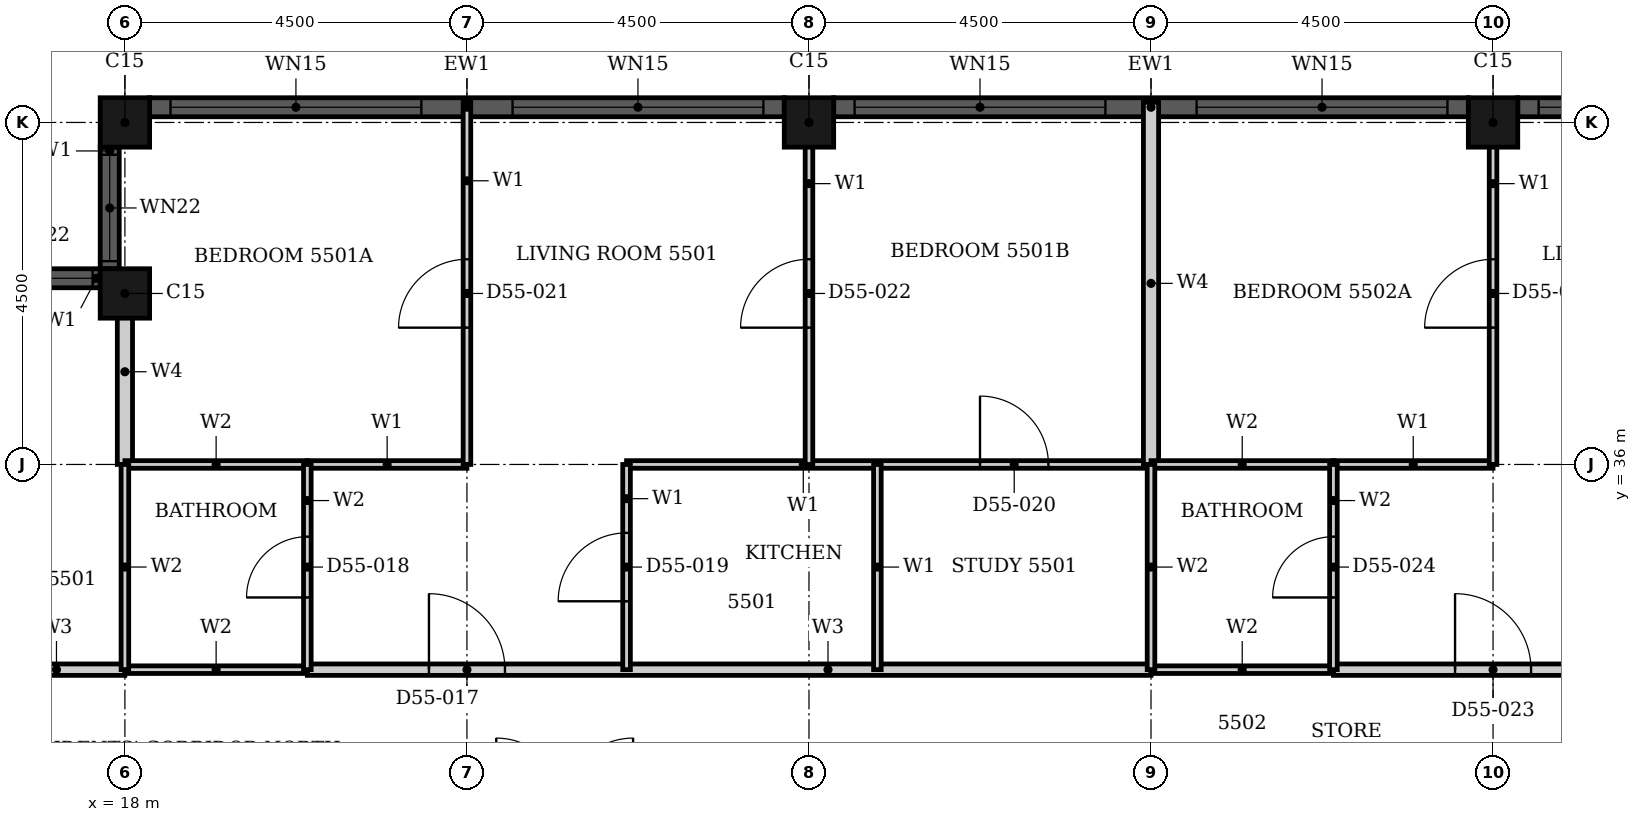
"""IFC4 building model, lengths in metres.
Left out: names, types, materials, properties, quantities, classifications, styles, units other than length and angle.
Written with IfcOpenShell. Run it as: python <this file> out.ifc"""

import sys

from ifc_helpers import new_model, si_unit, direction, frame, frame_2d, origin, origin_2d, place, context, subcontext, project, spatial, rectangle, hollow_rectangle, extrude, element, fill, save


model = new_model("IFC4")
c1 = context("Model", 3, precision=1e-05, world=origin(), true_north=direction((0.0, 1.0)))
c2 = subcontext(c1, "Body", "Model", "MODEL_VIEW")
j1 = project(units=[si_unit("LENGTHUNIT", "METRE"), si_unit("PLANEANGLEUNIT", "RADIAN")], contexts=[c1])
p1 = place(None, origin())
s1 = spatial("IfcSite", under=j1, at=p1, CompositionType="ELEMENT")
p2 = place(p1, origin())
s2 = spatial("IfcBuilding", under=s1, at=p2, CompositionType="ELEMENT")
p3 = place(p2, frame((0.0, 0.0, 218.3)))
s3 = spatial("IfcBuildingStorey", under=s2, at=p3, CompositionType="ELEMENT", Elevation=218.3)
for number, where, z_axis, x_axis in (
    (1, (36.0, 40.5, 0.0), (0.0, 0.0, 1.0), (1.0, 0.0, 0.0)),
    (2, (27.0, 40.5, 0.0), (0.0, 0.0, 1.0), (1.0, 0.0, 0.0)),
    (3, (18.0, 40.5, 0.0), (0.0, 0.0, 1.0), (1.0, 0.0, 0.0)),
    (4, (18.0, 38.25, 0.0), (0.0, 0.0, 1.0), (1.0, 0.0, 0.0)),
):
    element("IfcColumn", number, at=place(p3, frame(where, z_axis=z_axis, x_axis=x_axis)), inside=s3, PredefinedType="COLUMN", context=c2, shape_type="SweptSolid", body=[
        extrude(hollow_rectangle(XDim=0.65, YDim=0.65, WallThickness=0.021, at=origin_2d()), origin(), (0.0, 0.0, 1.0), 3.7),
    ])
p4 = place(p3, frame((44.675, 40.7, 0.0), z_axis=(0.0, 0.0, 1.0), x_axis=(-1.0, 0.0, 0.0)))
e5 = element("IfcWall", 5, at=p4, inside=s3, PredefinedType="SOLIDWALL", context=c2, shape_type="SweptSolid", body=[
    extrude(rectangle(XDim=8.35, YDim=0.25, at=frame_2d((4.175, 0.0))), origin(), (0.0, 0.0, 1.0), 3.7),
])
p5 = place(p4, frame((0.275, 0.0, 0.45)))
e6 = element("IfcOpeningElement", 6, at=p5, cuts=e5, PredefinedType="OPENING", context=c2, shape_type="SweptSolid", body=[
    extrude(rectangle(XDim=3.3, YDim=2.3, at=frame_2d((1.65, 1.15))), frame((0.0, 0.135, 0.0), z_axis=(0.0, -1.0, 0.0), x_axis=(1.0, 0.0, 0.0)), (0.0, 0.0, 1.0), 0.27),
])
p6 = place(p4, frame((4.775, 0.0, 0.45)))
e7 = element("IfcOpeningElement", 7, at=p6, cuts=e5, PredefinedType="OPENING", context=c2, shape_type="SweptSolid", body=[
    extrude(rectangle(XDim=3.3, YDim=2.3, at=frame_2d((1.65, 1.15))), frame((0.0, 0.135, 0.0), z_axis=(0.0, -1.0, 0.0), x_axis=(1.0, 0.0, 0.0)), (0.0, 0.0, 1.0), 0.27),
])
p7 = place(p3, frame((35.675, 40.7, 0.0), z_axis=(0.0, 0.0, 1.0), x_axis=(-1.0, 0.0, 0.0)))
e8 = element("IfcWall", 8, at=p7, inside=s3, PredefinedType="SOLIDWALL", context=c2, shape_type="SweptSolid", body=[
    extrude(rectangle(XDim=8.35, YDim=0.25, at=frame_2d((4.175, 0.0))), origin(), (0.0, 0.0, 1.0), 3.7),
])
p8 = place(p7, frame((0.275, 0.0, 0.45)))
e9 = element("IfcOpeningElement", 9, at=p8, cuts=e8, PredefinedType="OPENING", context=c2, shape_type="SweptSolid", body=[
    extrude(rectangle(XDim=3.3, YDim=2.3, at=frame_2d((1.65, 1.15))), frame((0.0, 0.135, 0.0), z_axis=(0.0, -1.0, 0.0), x_axis=(1.0, 0.0, 0.0)), (0.0, 0.0, 1.0), 0.27),
])
p9 = place(p7, frame((4.775, 0.0, 0.45)))
e10 = element("IfcOpeningElement", 10, at=p9, cuts=e8, PredefinedType="OPENING", context=c2, shape_type="SweptSolid", body=[
    extrude(rectangle(XDim=3.3, YDim=2.3, at=frame_2d((1.65, 1.15))), frame((0.0, 0.135, 0.0), z_axis=(0.0, -1.0, 0.0), x_axis=(1.0, 0.0, 0.0)), (0.0, 0.0, 1.0), 0.27),
])
p10 = place(p3, frame((26.675, 40.7, 0.0), z_axis=(0.0, 0.0, 1.0), x_axis=(-1.0, 0.0, 0.0)))
e11 = element("IfcWall", 11, at=p10, inside=s3, PredefinedType="SOLIDWALL", context=c2, shape_type="SweptSolid", body=[
    extrude(rectangle(XDim=8.35, YDim=0.25, at=frame_2d((4.175, 0.0))), origin(), (0.0, 0.0, 1.0), 3.7),
])
p11 = place(p10, frame((0.275, 0.0, 0.45)))
e12 = element("IfcOpeningElement", 12, at=p11, cuts=e11, PredefinedType="OPENING", context=c2, shape_type="SweptSolid", body=[
    extrude(rectangle(XDim=3.3, YDim=2.3, at=frame_2d((1.65, 1.15))), frame((0.0, 0.135, 0.0), z_axis=(0.0, -1.0, 0.0), x_axis=(1.0, 0.0, 0.0)), (0.0, 0.0, 1.0), 0.27),
])
p12 = place(p10, frame((4.775, 0.0, 0.45)))
e13 = element("IfcOpeningElement", 13, at=p12, cuts=e11, PredefinedType="OPENING", context=c2, shape_type="SweptSolid", body=[
    extrude(rectangle(XDim=3.3, YDim=2.3, at=frame_2d((1.65, 1.15))), frame((0.0, 0.135, 0.0), z_axis=(0.0, -1.0, 0.0), x_axis=(1.0, 0.0, 0.0)), (0.0, 0.0, 1.0), 0.27),
])
p13 = place(p3, frame((17.8, 40.175, 0.0), z_axis=(0.0, 0.0, 1.0), x_axis=(0.0, -1.0, 0.0)))
e14 = element("IfcWall", 14, at=p13, inside=s3, PredefinedType="SOLIDWALL", context=c2, shape_type="SweptSolid", body=[
    extrude(rectangle(XDim=1.6, YDim=0.25, at=frame_2d((0.8, 0.0))), origin(), (0.0, 0.0, 1.0), 3.7),
])
p14 = place(p13, frame((0.1, 0.0, 0.9)))
e15 = element("IfcOpeningElement", 15, at=p14, cuts=e14, PredefinedType="OPENING", context=c2, shape_type="SweptSolid", body=[
    extrude(rectangle(XDim=1.4, YDim=1.85, at=frame_2d((0.7, 0.925))), frame((0.0, 0.135, 0.0), z_axis=(0.0, -1.0, 0.0), x_axis=(1.0, 0.0, 0.0)), (0.0, 0.0, 1.0), 0.27),
])
p15 = place(p3, frame((17.675, 38.45, 0.0), z_axis=(0.0, 0.0, 1.0), x_axis=(-1.0, 0.0, 0.0)))
e16 = element("IfcWall", 16, at=p15, inside=s3, PredefinedType="SOLIDWALL", context=c2, shape_type="SweptSolid", body=[
    extrude(rectangle(XDim=1.6, YDim=0.25, at=frame_2d((0.8, 0.0))), origin(), (0.0, 0.0, 1.0), 3.7),
])
p16 = place(p15, frame((0.1, 0.0, 0.9)))
e17 = element("IfcOpeningElement", 17, at=p16, cuts=e16, PredefinedType="OPENING", context=c2, shape_type="SweptSolid", body=[
    extrude(rectangle(XDim=1.4, YDim=1.85, at=frame_2d((0.7, 0.925))), frame((0.0, 0.135, 0.0), z_axis=(0.0, -1.0, 0.0), x_axis=(1.0, 0.0, 0.0)), (0.0, 0.0, 1.0), 0.27),
])
p17 = place(p3, frame((20.4, 33.3, 0.0), z_axis=(0.0, 0.0, 1.0), x_axis=(1.0, 0.0, 0.0)))
e18 = element("IfcWall", 18, at=p17, inside=s3, PredefinedType="PARTITIONING", context=c2, shape_type="SweptSolid", body=[
    extrude(rectangle(XDim=11.1, YDim=0.15, at=frame_2d((5.55, 0.0))), origin(), (0.0, 0.0, 1.0), 3.4),
])
p18 = place(p17, frame((1.6, 0.0, 0.0)))
e19 = element("IfcOpeningElement", 19, at=p18, cuts=e18, PredefinedType="OPENING", context=c2, shape_type="SweptSolid", body=[
    extrude(rectangle(XDim=1.0, YDim=2.2, at=frame_2d((0.5, 1.1))), frame((0.0, 0.085, 0.0), z_axis=(0.0, -1.0, 0.0), x_axis=(1.0, 0.0, 0.0)), (0.0, 0.0, 1.0), 0.17),
])
p19 = place(p3, frame((33.9, 33.3, 0.0), z_axis=(0.0, 0.0, 1.0), x_axis=(1.0, 0.0, 0.0)))
e20 = element("IfcWall", 20, at=p19, inside=s3, PredefinedType="PARTITIONING", context=c2, shape_type="SweptSolid", body=[
    extrude(rectangle(XDim=11.1, YDim=0.15, at=frame_2d((5.55, 0.0))), origin(), (0.0, 0.0, 1.0), 3.4),
])
p20 = place(p19, frame((1.6, 0.0, 0.0)))
e21 = element("IfcOpeningElement", 21, at=p20, cuts=e20, PredefinedType="OPENING", context=c2, shape_type="SweptSolid", body=[
    extrude(rectangle(XDim=1.0, YDim=2.2, at=frame_2d((0.5, 1.1))), frame((0.0, 0.085, 0.0), z_axis=(0.0, -1.0, 0.0), x_axis=(1.0, 0.0, 0.0)), (0.0, 0.0, 1.0), 0.17),
])
p21 = place(p3, frame((16.2, 33.3, 0.0), z_axis=(0.0, 0.0, 1.0), x_axis=(1.0, 0.0, 0.0)))
e22 = element("IfcWall", 22, at=p21, inside=s3, PredefinedType="PARTITIONING", context=c2, shape_type="SweptSolid", body=[
    extrude(rectangle(XDim=1.799, YDim=0.15, at=frame_2d((0.899, 0.0))), origin(), (0.0, 0.0, 1.0), 3.4),
])
p22 = place(p3, frame((20.4, 36.0, 0.0), z_axis=(0.0, 0.0, 1.0), x_axis=(1.0, 0.0, 0.0)))
e23 = element("IfcWall", 23, at=p22, inside=s3, PredefinedType="PARTITIONING", context=c2, shape_type="SweptSolid", body=[
    extrude(rectangle(XDim=2.1, YDim=0.1, at=frame_2d((1.05, 0.0))), origin(), (0.0, 0.0, 1.0), 3.4),
])
p23 = place(p3, frame((24.6, 36.0, 0.0), z_axis=(0.0, 0.0, 1.0), x_axis=(1.0, 0.0, 0.0)))
e24 = element("IfcWall", 24, at=p23, inside=s3, PredefinedType="PARTITIONING", context=c2, shape_type="SweptSolid", body=[
    extrude(rectangle(XDim=6.9, YDim=0.1, at=frame_2d((3.45, 0.0))), origin(), (0.0, 0.0, 1.0), 3.4),
])
p24 = place(p23, frame((4.65, 0.0, 0.0)))
e25 = element("IfcOpeningElement", 25, at=p24, cuts=e24, PredefinedType="OPENING", context=c2, shape_type="SweptSolid", body=[
    extrude(rectangle(XDim=0.9, YDim=2.1, at=frame_2d((0.45, 1.05))), frame((0.0, 0.06, 0.0), z_axis=(0.0, -1.0, 0.0), x_axis=(1.0, 0.0, 0.0)), (0.0, 0.0, 1.0), 0.12),
])
p25 = place(p3, frame((33.9, 36.0, 0.0), z_axis=(0.0, 0.0, 1.0), x_axis=(1.0, 0.0, 0.0)))
e26 = element("IfcWall", 26, at=p25, inside=s3, PredefinedType="PARTITIONING", context=c2, shape_type="SweptSolid", body=[
    extrude(rectangle(XDim=2.1, YDim=0.1, at=frame_2d((1.05, 0.0))), origin(), (0.0, 0.0, 1.0), 3.4),
])
p26 = place(p3, frame((22.5, 36.0, 0.0), z_axis=(0.0, 0.0, 1.0), x_axis=(0.0, 1.0, 0.0)))
e27 = element("IfcWall", 27, at=p26, inside=s3, PredefinedType="PARTITIONING", context=c2, shape_type="SweptSolid", body=[
    extrude(rectangle(XDim=4.765, YDim=0.1, at=frame_2d((2.382, 0.0))), origin(), (0.0, 0.0, 1.0), 3.4),
])
p27 = place(p26, frame((1.8, 0.0, 0.0)))
e28 = element("IfcOpeningElement", 28, at=p27, cuts=e27, PredefinedType="OPENING", context=c2, shape_type="SweptSolid", body=[
    extrude(rectangle(XDim=0.9, YDim=2.1, at=frame_2d((0.45, 1.05))), frame((0.0, 0.06, 0.0), z_axis=(0.0, -1.0, 0.0), x_axis=(1.0, 0.0, 0.0)), (0.0, 0.0, 1.0), 0.12),
])
p28 = place(p3, frame((24.6, 33.3, 0.0), z_axis=(0.0, 0.0, 1.0), x_axis=(0.0, 1.0, 0.0)))
e29 = element("IfcWall", 29, at=p28, inside=s3, PredefinedType="PARTITIONING", context=c2, shape_type="SweptSolid", body=[
    extrude(rectangle(XDim=2.7, YDim=0.1, at=frame_2d((1.35, 0.0))), origin(), (0.0, 0.0, 1.0), 3.4),
])
p29 = place(p28, frame((0.9, 0.0, 0.0)))
e30 = element("IfcOpeningElement", 30, at=p29, cuts=e29, PredefinedType="OPENING", context=c2, shape_type="SweptSolid", body=[
    extrude(rectangle(XDim=0.9, YDim=2.1, at=frame_2d((0.45, 1.05))), frame((0.0, 0.06, 0.0), z_axis=(0.0, -1.0, 0.0), x_axis=(1.0, 0.0, 0.0)), (0.0, 0.0, 1.0), 0.12),
])
p30 = place(p3, frame((27.0, 36.0, 0.0), z_axis=(0.0, 0.0, 1.0), x_axis=(0.0, 1.0, 0.0)))
e31 = element("IfcWall", 31, at=p30, inside=s3, PredefinedType="PARTITIONING", context=c2, shape_type="SweptSolid", body=[
    extrude(rectangle(XDim=4.69, YDim=0.1, at=frame_2d((2.345, 0.0))), origin(), (0.0, 0.0, 1.0), 3.4),
])
p31 = place(p30, frame((1.8, 0.0, 0.0)))
e32 = element("IfcOpeningElement", 32, at=p31, cuts=e31, PredefinedType="OPENING", context=c2, shape_type="SweptSolid", body=[
    extrude(rectangle(XDim=0.9, YDim=2.1, at=frame_2d((0.45, 1.05))), frame((0.0, 0.06, 0.0), z_axis=(0.0, -1.0, 0.0), x_axis=(1.0, 0.0, 0.0)), (0.0, 0.0, 1.0), 0.12),
])
p32 = place(p3, frame((27.9, 33.3, 0.0), z_axis=(0.0, 0.0, 1.0), x_axis=(0.0, 1.0, 0.0)))
e33 = element("IfcWall", 33, at=p32, inside=s3, PredefinedType="PARTITIONING", context=c2, shape_type="SweptSolid", body=[
    extrude(rectangle(XDim=2.7, YDim=0.1, at=frame_2d((1.35, 0.0))), origin(), (0.0, 0.0, 1.0), 3.4),
])
p33 = place(p3, frame((36.0, 36.0, 0.0), z_axis=(0.0, 0.0, 1.0), x_axis=(0.0, 1.0, 0.0)))
e34 = element("IfcWall", 34, at=p33, inside=s3, PredefinedType="PARTITIONING", context=c2, shape_type="SweptSolid", body=[
    extrude(rectangle(XDim=4.69, YDim=0.1, at=frame_2d((2.345, 0.0))), origin(), (0.0, 0.0, 1.0), 3.4),
])
p34 = place(p33, frame((1.8, 0.0, 0.0)))
e35 = element("IfcOpeningElement", 35, at=p34, cuts=e34, PredefinedType="OPENING", context=c2, shape_type="SweptSolid", body=[
    extrude(rectangle(XDim=0.9, YDim=2.1, at=frame_2d((0.45, 1.05))), frame((0.0, 0.06, 0.0), z_axis=(0.0, -1.0, 0.0), x_axis=(1.0, 0.0, 0.0)), (0.0, 0.0, 1.0), 0.12),
])
p35 = place(p3, frame((18.0, 36.0, 0.0), z_axis=(0.0, 0.0, 1.0), x_axis=(0.0, 1.0, 0.0)))
e36 = element("IfcWall", 36, at=p35, inside=s3, PredefinedType="PARTITIONING", context=c2, shape_type="SweptSolid", body=[
    extrude(rectangle(XDim=2.44, YDim=0.2, at=frame_2d((1.22, 0.0))), origin(), (0.0, 0.0, 1.0), 3.4),
])
p36 = place(p3, frame((31.5, 36.0, 0.0), z_axis=(0.0, 0.0, 1.0), x_axis=(0.0, 1.0, 0.0)))
e37 = element("IfcWall", 37, at=p36, inside=s3, PredefinedType="PARTITIONING", context=c2, shape_type="SweptSolid", body=[
    extrude(rectangle(XDim=4.765, YDim=0.2, at=frame_2d((2.382, 0.0))), origin(), (0.0, 0.0, 1.0), 3.4),
])
for number, where, z_axis, x_axis in (
    (38, (18.0, 33.3, 0.0), (0.0, 0.0, 1.0), (1.0, 0.0, 0.0)),
    (39, (31.5, 33.3, 0.0), (0.0, 0.0, 1.0), (1.0, 0.0, 0.0)),
    (40, (18.0, 36.0, 0.0), (0.0, 0.0, 1.0), (1.0, 0.0, 0.0)),
    (41, (31.5, 36.0, 0.0), (0.0, 0.0, 1.0), (1.0, 0.0, 0.0)),
):
    element("IfcWall", number, at=place(p3, frame(where, z_axis=z_axis, x_axis=x_axis)), inside=s3, PredefinedType="PARTITIONING", context=c2, shape_type="SweptSolid", body=[
        extrude(rectangle(XDim=2.4, YDim=0.1, at=frame_2d((1.2, 0.0))), origin(), (0.0, 0.0, 1.0), 3.4),
    ])
p37 = place(p3, frame((18.0, 33.301, 0.0), z_axis=(0.0, 0.0, 1.0), x_axis=(0.0, 1.0, 0.0)))
e42 = element("IfcWall", 42, at=p37, inside=s3, PredefinedType="PARTITIONING", context=c2, shape_type="SweptSolid", body=[
    extrude(rectangle(XDim=2.699, YDim=0.1, at=frame_2d((1.35, 0.0))), origin(), (0.0, 0.0, 1.0), 3.4),
])
p38 = place(p3, frame((20.4, 33.3, 0.0), z_axis=(0.0, 0.0, 1.0), x_axis=(0.0, 1.0, 0.0)))
e43 = element("IfcWall", 43, at=p38, inside=s3, PredefinedType="PARTITIONING", context=c2, shape_type="SweptSolid", body=[
    extrude(rectangle(XDim=2.7, YDim=0.1, at=frame_2d((1.35, 0.0))), origin(), (0.0, 0.0, 1.0), 3.4),
])
p39 = place(p38, frame((0.95, 0.0, 0.0)))
e44 = element("IfcOpeningElement", 44, at=p39, cuts=e43, PredefinedType="OPENING", context=c2, shape_type="SweptSolid", body=[
    extrude(rectangle(XDim=0.8, YDim=2.1, at=frame_2d((0.4, 1.05))), frame((0.0, 0.06, 0.0), z_axis=(0.0, -1.0, 0.0), x_axis=(1.0, 0.0, 0.0)), (0.0, 0.0, 1.0), 0.12),
])
p40 = place(p3, frame((31.5, 33.3, 0.0), z_axis=(0.0, 0.0, 1.0), x_axis=(0.0, 1.0, 0.0)))
e45 = element("IfcWall", 45, at=p40, inside=s3, PredefinedType="PARTITIONING", context=c2, shape_type="SweptSolid", body=[
    extrude(rectangle(XDim=2.7, YDim=0.1, at=frame_2d((1.35, 0.0))), origin(), (0.0, 0.0, 1.0), 3.4),
])
p41 = place(p3, frame((33.9, 33.3, 0.0), z_axis=(0.0, 0.0, 1.0), x_axis=(0.0, 1.0, 0.0)))
e46 = element("IfcWall", 46, at=p41, inside=s3, PredefinedType="PARTITIONING", context=c2, shape_type="SweptSolid", body=[
    extrude(rectangle(XDim=2.7, YDim=0.1, at=frame_2d((1.35, 0.0))), origin(), (0.0, 0.0, 1.0), 3.4),
])
p42 = place(p41, frame((0.95, 0.0, 0.0)))
e47 = element("IfcOpeningElement", 47, at=p42, cuts=e46, PredefinedType="OPENING", context=c2, shape_type="SweptSolid", body=[
    extrude(rectangle(XDim=0.8, YDim=2.1, at=frame_2d((0.4, 1.05))), frame((0.0, 0.06, 0.0), z_axis=(0.0, -1.0, 0.0), x_axis=(1.0, 0.0, 0.0)), (0.0, 0.0, 1.0), 0.12),
])
p43 = place(p6, origin())
e48 = element("IfcWindow", 48, at=p43, inside=s3, PartitioningType="SINGLE_PANEL", PredefinedType="WINDOW", context=c2, shape_type="SweptSolid", body=[
    extrude(rectangle(XDim=3.3, YDim=2.3, at=frame_2d((1.65, 1.15))), frame((0.0, 0.03, 0.0), z_axis=(0.0, -1.0, 0.0), x_axis=(1.0, 0.0, 0.0)), (0.0, 0.0, 1.0), 0.06),
])
fill(e7, e48)
p44 = place(p8, origin())
e49 = element("IfcWindow", 49, at=p44, inside=s3, PartitioningType="SINGLE_PANEL", PredefinedType="WINDOW", context=c2, shape_type="SweptSolid", body=[
    extrude(rectangle(XDim=3.3, YDim=2.3, at=frame_2d((1.65, 1.15))), frame((0.0, 0.03, 0.0), z_axis=(0.0, -1.0, 0.0), x_axis=(1.0, 0.0, 0.0)), (0.0, 0.0, 1.0), 0.06),
])
fill(e9, e49)
p45 = place(p9, origin())
e50 = element("IfcWindow", 50, at=p45, inside=s3, PartitioningType="SINGLE_PANEL", PredefinedType="WINDOW", context=c2, shape_type="SweptSolid", body=[
    extrude(rectangle(XDim=3.3, YDim=2.3, at=frame_2d((1.65, 1.15))), frame((0.0, 0.03, 0.0), z_axis=(0.0, -1.0, 0.0), x_axis=(1.0, 0.0, 0.0)), (0.0, 0.0, 1.0), 0.06),
])
fill(e10, e50)
p46 = place(p11, origin())
e51 = element("IfcWindow", 51, at=p46, inside=s3, PartitioningType="SINGLE_PANEL", PredefinedType="WINDOW", context=c2, shape_type="SweptSolid", body=[
    extrude(rectangle(XDim=3.3, YDim=2.3, at=frame_2d((1.65, 1.15))), frame((0.0, 0.03, 0.0), z_axis=(0.0, -1.0, 0.0), x_axis=(1.0, 0.0, 0.0)), (0.0, 0.0, 1.0), 0.06),
])
fill(e12, e51)
p47 = place(p12, origin())
e52 = element("IfcWindow", 52, at=p47, inside=s3, PartitioningType="SINGLE_PANEL", PredefinedType="WINDOW", context=c2, shape_type="SweptSolid", body=[
    extrude(rectangle(XDim=3.3, YDim=2.3, at=frame_2d((1.65, 1.15))), frame((0.0, 0.03, 0.0), z_axis=(0.0, -1.0, 0.0), x_axis=(1.0, 0.0, 0.0)), (0.0, 0.0, 1.0), 0.06),
])
fill(e13, e52)
p48 = place(p14, origin())
e53 = element("IfcWindow", 53, at=p48, inside=s3, PartitioningType="SINGLE_PANEL", PredefinedType="WINDOW", context=c2, shape_type="SweptSolid", body=[
    extrude(rectangle(XDim=1.4, YDim=1.85, at=frame_2d((0.7, 0.925))), frame((0.0, 0.03, 0.0), z_axis=(0.0, -1.0, 0.0), x_axis=(1.0, 0.0, 0.0)), (0.0, 0.0, 1.0), 0.06),
])
fill(e15, e53)
p49 = place(p16, origin())
e54 = element("IfcWindow", 54, at=p49, inside=s3, PartitioningType="SINGLE_PANEL", PredefinedType="WINDOW", context=c2, shape_type="SweptSolid", body=[
    extrude(rectangle(XDim=1.4, YDim=1.85, at=frame_2d((0.7, 0.925))), frame((0.0, 0.03, 0.0), z_axis=(0.0, -1.0, 0.0), x_axis=(1.0, 0.0, 0.0)), (0.0, 0.0, 1.0), 0.06),
])
fill(e17, e54)
p50 = place(p18, origin())
e55 = element("IfcDoor", 55, at=p50, inside=s3, OperationType="SINGLE_SWING_LEFT", PredefinedType="DOOR", context=c2, shape_type="SweptSolid", body=[
    extrude(rectangle(XDim=1.0, YDim=2.2, at=frame_2d((0.5, 1.1))), frame((0.0, 0.025, 0.0), z_axis=(0.0, -1.0, 0.0), x_axis=(1.0, 0.0, 0.0)), (0.0, 0.0, 1.0), 0.05),
])
fill(e19, e55)
p51 = place(p39, origin())
e56 = element("IfcDoor", 56, at=p51, inside=s3, OperationType="SINGLE_SWING_RIGHT", PredefinedType="DOOR", context=c2, shape_type="SweptSolid", body=[
    extrude(rectangle(XDim=0.8, YDim=2.1, at=frame_2d((0.4, 1.05))), frame((0.0, 0.025, 0.0), z_axis=(0.0, -1.0, 0.0), x_axis=(1.0, 0.0, 0.0)), (0.0, 0.0, 1.0), 0.05),
])
fill(e44, e56)
p52 = place(p29, origin())
e57 = element("IfcDoor", 57, at=p52, inside=s3, OperationType="SINGLE_SWING_RIGHT", PredefinedType="DOOR", context=c2, shape_type="SweptSolid", body=[
    extrude(rectangle(XDim=0.9, YDim=2.1, at=frame_2d((0.45, 1.05))), frame((0.0, 0.025, 0.0), z_axis=(0.0, -1.0, 0.0), x_axis=(1.0, 0.0, 0.0)), (0.0, 0.0, 1.0), 0.05),
])
fill(e30, e57)
p53 = place(p24, origin())
e58 = element("IfcDoor", 58, at=p53, inside=s3, OperationType="SINGLE_SWING_RIGHT", PredefinedType="DOOR", context=c2, shape_type="SweptSolid", body=[
    extrude(rectangle(XDim=0.9, YDim=2.1, at=frame_2d((0.45, 1.05))), frame((0.0, 0.025, 0.0), z_axis=(0.0, -1.0, 0.0), x_axis=(1.0, 0.0, 0.0)), (0.0, 0.0, 1.0), 0.05),
])
fill(e25, e58)
p54 = place(p27, origin())
e59 = element("IfcDoor", 59, at=p54, inside=s3, OperationType="SINGLE_SWING_LEFT", PredefinedType="DOOR", context=c2, shape_type="SweptSolid", body=[
    extrude(rectangle(XDim=0.9, YDim=2.1, at=frame_2d((0.45, 1.05))), frame((0.0, 0.025, 0.0), z_axis=(0.0, -1.0, 0.0), x_axis=(1.0, 0.0, 0.0)), (0.0, 0.0, 1.0), 0.05),
])
fill(e28, e59)
p55 = place(p31, origin())
e60 = element("IfcDoor", 60, at=p55, inside=s3, OperationType="SINGLE_SWING_RIGHT", PredefinedType="DOOR", context=c2, shape_type="SweptSolid", body=[
    extrude(rectangle(XDim=0.9, YDim=2.1, at=frame_2d((0.45, 1.05))), frame((0.0, 0.025, 0.0), z_axis=(0.0, -1.0, 0.0), x_axis=(1.0, 0.0, 0.0)), (0.0, 0.0, 1.0), 0.05),
])
fill(e32, e60)
p56 = place(p20, origin())
e61 = element("IfcDoor", 61, at=p56, inside=s3, OperationType="SINGLE_SWING_LEFT", PredefinedType="DOOR", context=c2, shape_type="SweptSolid", body=[
    extrude(rectangle(XDim=1.0, YDim=2.2, at=frame_2d((0.5, 1.1))), frame((0.0, 0.025, 0.0), z_axis=(0.0, -1.0, 0.0), x_axis=(1.0, 0.0, 0.0)), (0.0, 0.0, 1.0), 0.05),
])
fill(e21, e61)
p57 = place(p42, origin())
e62 = element("IfcDoor", 62, at=p57, inside=s3, OperationType="SINGLE_SWING_LEFT", PredefinedType="DOOR", context=c2, shape_type="SweptSolid", body=[
    extrude(rectangle(XDim=0.8, YDim=2.1, at=frame_2d((0.4, 1.05))), frame((0.0, 0.025, 0.0), z_axis=(0.0, -1.0, 0.0), x_axis=(1.0, 0.0, 0.0)), (0.0, 0.0, 1.0), 0.05),
])
fill(e47, e62)
p58 = place(p34, origin())
e63 = element("IfcDoor", 63, at=p58, inside=s3, OperationType="SINGLE_SWING_LEFT", PredefinedType="DOOR", context=c2, shape_type="SweptSolid", body=[
    extrude(rectangle(XDim=0.9, YDim=2.1, at=frame_2d((0.45, 1.05))), frame((0.0, 0.025, 0.0), z_axis=(0.0, -1.0, 0.0), x_axis=(1.0, 0.0, 0.0)), (0.0, 0.0, 1.0), 0.05),
])
fill(e35, e63)
save(model, sys.argv[1])
